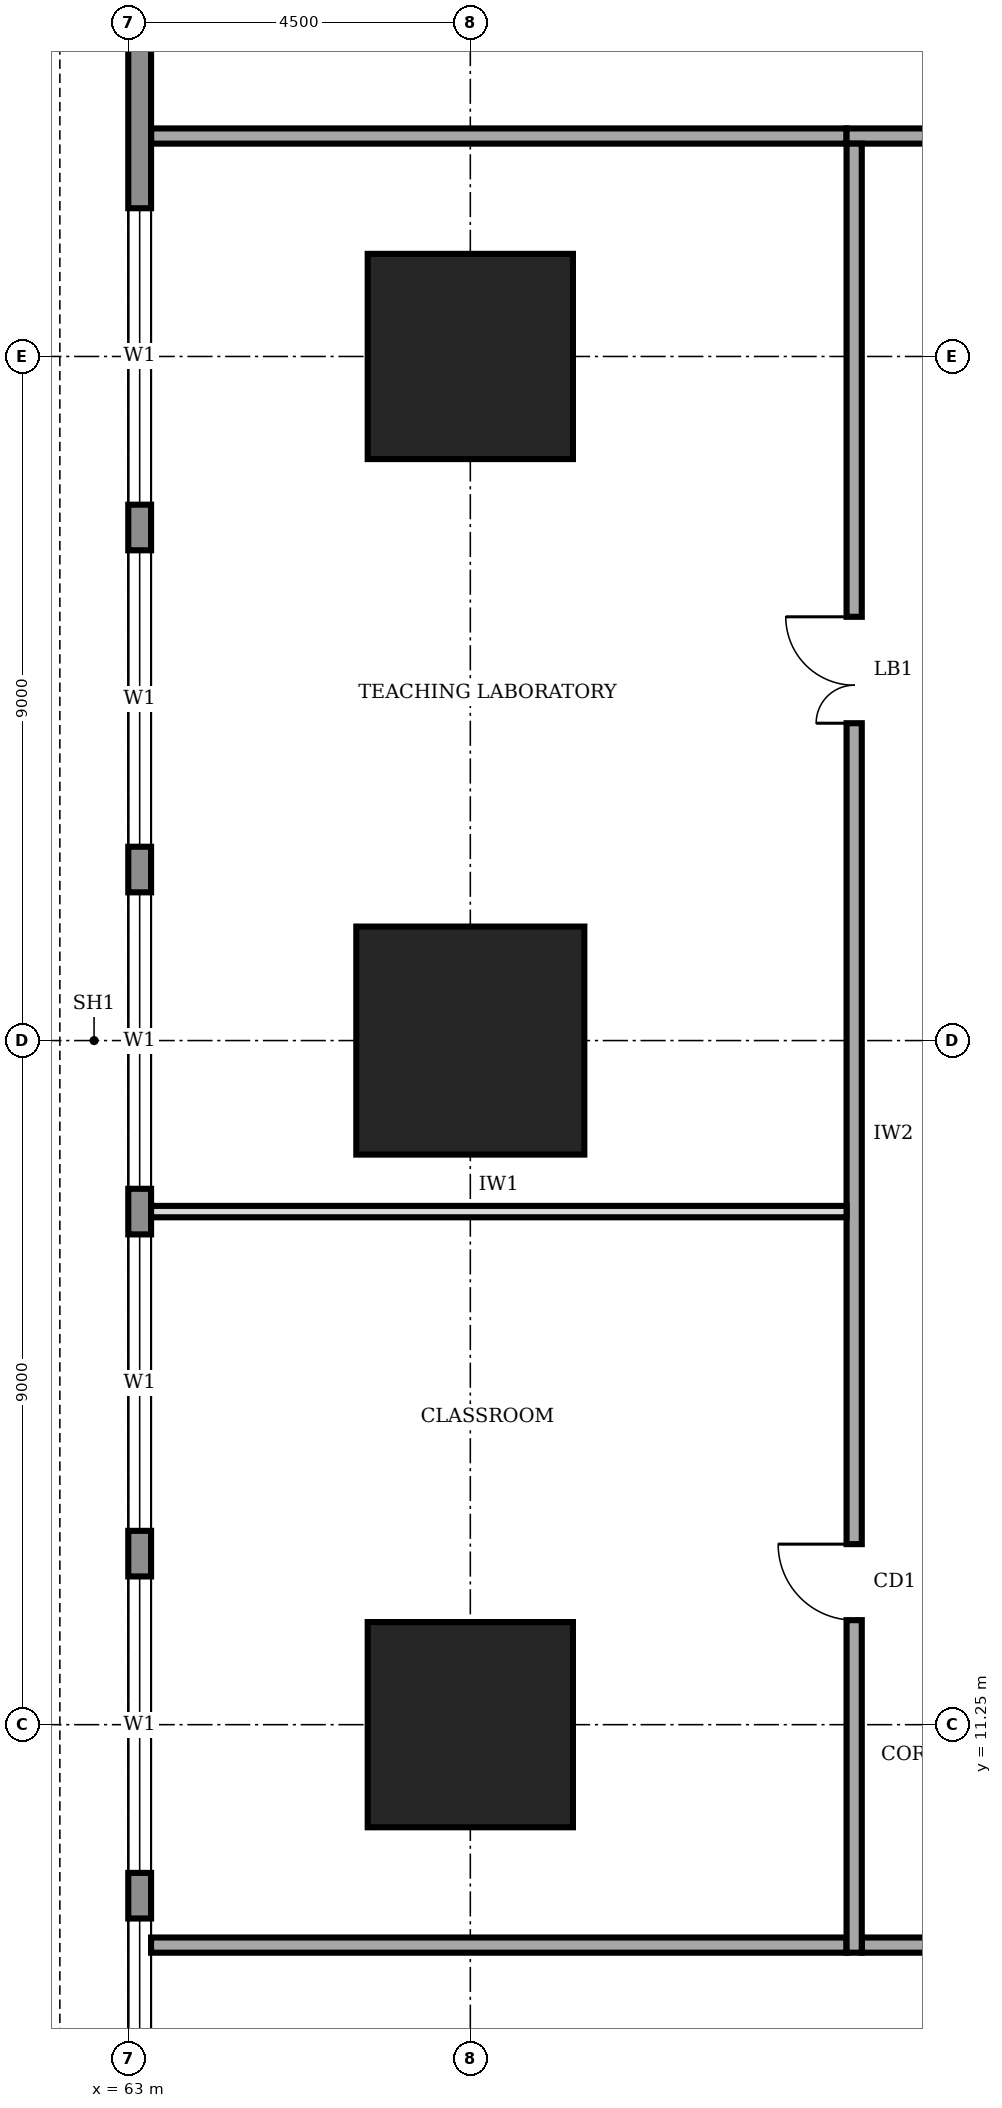
"""IFC4 building model, lengths in metres.
Left out: names, types, materials, properties, quantities, classifications, styles, units other than length and angle.
Written with IfcOpenShell. Run it as: python <this file> out.ifc"""

import sys

from ifc_helpers import new_model, si_unit, direction, frame, frame_2d, origin, origin_2d, place, context, subcontext, project, spatial, rectangle, extrude, element, fill, save


model = new_model("IFC4")
c1 = context("Model", 3, precision=1e-05, world=origin(), true_north=direction((0.0, 1.0)))
c2 = subcontext(c1, "Body", "Model", "MODEL_VIEW")
j1 = project(units=[si_unit("LENGTHUNIT", "METRE"), si_unit("PLANEANGLEUNIT", "RADIAN")], contexts=[c1])
p1 = place(None, origin())
s1 = spatial("IfcSite", under=j1, at=p1, CompositionType="ELEMENT")
p2 = place(p1, origin())
s2 = spatial("IfcBuilding", under=s1, at=p2, CompositionType="ELEMENT")
p3 = place(p2, frame((0.0, 0.0, 45.0)))
s3 = spatial("IfcBuildingStorey", under=s2, at=p3, CompositionType="ELEMENT", Elevation=45.0)
p4 = place(p3, frame((67.5, 11.25, 0.0), z_axis=(0.0, 0.0, 1.0), x_axis=(1.0, 0.0, 0.0)))
e1 = element("IfcColumn", 1, at=p4, inside=s3, PredefinedType="COLUMN", context=c2, shape_type="SweptSolid", body=[
    extrude(rectangle(XDim=2.7, YDim=2.7, at=origin_2d()), origin(), (0.0, 0.0, 1.0), 4.0),
])
p5 = place(p3, frame((67.5, 20.25, 0.0), z_axis=(0.0, 0.0, 1.0), x_axis=(1.0, 0.0, 0.0)))
e2 = element("IfcColumn", 2, at=p5, inside=s3, PredefinedType="COLUMN", context=c2, shape_type="SweptSolid", body=[
    extrude(rectangle(XDim=3.0, YDim=3.0, at=origin_2d()), origin(), (0.0, 0.0, 1.0), 4.0),
])
p6 = place(p3, frame((67.5, 29.25, 0.0), z_axis=(0.0, 0.0, 1.0), x_axis=(1.0, 0.0, 0.0)))
e3 = element("IfcColumn", 3, at=p6, inside=s3, PredefinedType="COLUMN", context=c2, shape_type="SweptSolid", body=[
    extrude(rectangle(XDim=2.7, YDim=2.7, at=origin_2d()), origin(), (0.0, 0.0, 1.0), 4.0),
])
p7 = place(p3, frame((63.15, 35.98, 0.0), z_axis=(0.0, 0.0, 1.0), x_axis=(0.0, -1.0, 0.0)))
e4 = element("IfcWall", 4, at=p7, inside=s3, PredefinedType="STANDARD", context=c2, shape_type="SweptSolid", body=[
    extrude(rectangle(XDim=31.46, YDim=0.3, at=frame_2d((15.73, 0.0))), origin(), (0.0, 0.0, 1.0), 3.75),
])
p8 = place(p7, frame((27.28, 0.0, 0.9)))
e5 = element("IfcOpeningElement", 5, at=p8, cuts=e4, PredefinedType="OPENING", context=c2, shape_type="SweptSolid", body=[
    extrude(rectangle(XDim=3.9, YDim=2.2, at=frame_2d((1.95, 1.1))), frame((0.0, 0.16, 0.0), z_axis=(0.0, -1.0, 0.0), x_axis=(1.0, 0.0, 0.0)), (0.0, 0.0, 1.0), 0.32),
])
p9 = place(p7, frame((22.78, 0.0, 0.9)))
e6 = element("IfcOpeningElement", 6, at=p9, cuts=e4, PredefinedType="OPENING", context=c2, shape_type="SweptSolid", body=[
    extrude(rectangle(XDim=3.9, YDim=2.2, at=frame_2d((1.95, 1.1))), frame((0.0, 0.16, 0.0), z_axis=(0.0, -1.0, 0.0), x_axis=(1.0, 0.0, 0.0)), (0.0, 0.0, 1.0), 0.32),
])
p10 = place(p7, frame((18.28, 0.0, 0.9)))
e7 = element("IfcOpeningElement", 7, at=p10, cuts=e4, PredefinedType="OPENING", context=c2, shape_type="SweptSolid", body=[
    extrude(rectangle(XDim=3.9, YDim=2.2, at=frame_2d((1.95, 1.1))), frame((0.0, 0.16, 0.0), z_axis=(0.0, -1.0, 0.0), x_axis=(1.0, 0.0, 0.0)), (0.0, 0.0, 1.0), 0.32),
])
p11 = place(p7, frame((13.78, 0.0, 0.9)))
e8 = element("IfcOpeningElement", 8, at=p11, cuts=e4, PredefinedType="OPENING", context=c2, shape_type="SweptSolid", body=[
    extrude(rectangle(XDim=3.9, YDim=2.2, at=frame_2d((1.95, 1.1))), frame((0.0, 0.16, 0.0), z_axis=(0.0, -1.0, 0.0), x_axis=(1.0, 0.0, 0.0)), (0.0, 0.0, 1.0), 0.32),
])
p12 = place(p7, frame((9.28, 0.0, 0.9)))
e9 = element("IfcOpeningElement", 9, at=p12, cuts=e4, PredefinedType="OPENING", context=c2, shape_type="SweptSolid", body=[
    extrude(rectangle(XDim=3.9, YDim=2.2, at=frame_2d((1.95, 1.1))), frame((0.0, 0.16, 0.0), z_axis=(0.0, -1.0, 0.0), x_axis=(1.0, 0.0, 0.0)), (0.0, 0.0, 1.0), 0.32),
])
p13 = place(p7, frame((4.78, 0.0, 0.9)))
e10 = element("IfcOpeningElement", 10, at=p13, cuts=e4, PredefinedType="OPENING", context=c2, shape_type="SweptSolid", body=[
    extrude(rectangle(XDim=3.9, YDim=2.2, at=frame_2d((1.95, 1.1))), frame((0.0, 0.16, 0.0), z_axis=(0.0, -1.0, 0.0), x_axis=(1.0, 0.0, 0.0)), (0.0, 0.0, 1.0), 0.32),
])
p14 = place(p3, frame((72.65, 8.35, 0.0), z_axis=(0.0, 0.0, 1.0), x_axis=(1.0, 0.0, 0.0)))
e11 = element("IfcWall", 11, at=p14, inside=s3, PredefinedType="SOLIDWALL", context=c2, shape_type="SweptSolid", body=[
    extrude(rectangle(XDim=16.9, YDim=0.2, at=frame_2d((8.45, 0.0))), origin(), (0.0, 0.0, 1.0), 3.75),
])
p15 = place(p14, frame((1.325, 0.0, 0.0)))
e12 = element("IfcOpeningElement", 12, at=p15, cuts=e11, PredefinedType="OPENING", context=c2, shape_type="SweptSolid", body=[
    extrude(rectangle(XDim=1.0, YDim=2.1, at=frame_2d((0.5, 1.05))), frame((0.0, 0.11, 0.0), z_axis=(0.0, -1.0, 0.0), x_axis=(1.0, 0.0, 0.0)), (0.0, 0.0, 1.0), 0.22),
])
p16 = place(p14, frame((5.6, 0.0, 0.0)))
e13 = element("IfcOpeningElement", 13, at=p16, cuts=e11, PredefinedType="OPENING", context=c2, shape_type="SweptSolid", body=[
    extrude(rectangle(XDim=1.0, YDim=2.1, at=frame_2d((0.5, 1.05))), frame((0.0, 0.11, 0.0), z_axis=(0.0, -1.0, 0.0), x_axis=(1.0, 0.0, 0.0)), (0.0, 0.0, 1.0), 0.22),
])
p17 = place(p14, frame((11.925, 0.0, 0.0)))
e14 = element("IfcOpeningElement", 14, at=p17, cuts=e11, PredefinedType="OPENING", context=c2, shape_type="SweptSolid", body=[
    extrude(rectangle(XDim=1.4, YDim=2.1, at=frame_2d((0.7, 1.05))), frame((0.0, 0.11, 0.0), z_axis=(0.0, -1.0, 0.0), x_axis=(1.0, 0.0, 0.0)), (0.0, 0.0, 1.0), 0.22),
])
p18 = place(p3, frame((89.35, 32.15, 0.0), z_axis=(0.0, 0.0, 1.0), x_axis=(-1.0, 0.0, 0.0)))
e15 = element("IfcWall", 15, at=p18, inside=s3, PredefinedType="SOLIDWALL", context=c2, shape_type="SweptSolid", body=[
    extrude(rectangle(XDim=16.9, YDim=0.2, at=frame_2d((8.45, 0.0))), origin(), (0.0, 0.0, 1.0), 3.75),
])
p19 = place(p18, frame((14.375, 0.0, 0.0)))
e16 = element("IfcOpeningElement", 16, at=p19, cuts=e15, PredefinedType="OPENING", context=c2, shape_type="SweptSolid", body=[
    extrude(rectangle(XDim=1.0, YDim=2.1, at=frame_2d((0.5, 1.05))), frame((0.0, 0.11, 0.0), z_axis=(0.0, -1.0, 0.0), x_axis=(1.0, 0.0, 0.0)), (0.0, 0.0, 1.0), 0.22),
])
p20 = place(p18, frame((7.85, 0.0, 0.0)))
e17 = element("IfcOpeningElement", 17, at=p20, cuts=e15, PredefinedType="OPENING", context=c2, shape_type="SweptSolid", body=[
    extrude(rectangle(XDim=1.0, YDim=2.1, at=frame_2d((0.5, 1.05))), frame((0.0, 0.11, 0.0), z_axis=(0.0, -1.0, 0.0), x_axis=(1.0, 0.0, 0.0)), (0.0, 0.0, 1.0), 0.22),
])
p21 = place(p18, frame((1.325, 0.0, 0.0)))
e18 = element("IfcOpeningElement", 18, at=p21, cuts=e15, PredefinedType="OPENING", context=c2, shape_type="SweptSolid", body=[
    extrude(rectangle(XDim=1.0, YDim=2.1, at=frame_2d((0.5, 1.05))), frame((0.0, 0.11, 0.0), z_axis=(0.0, -1.0, 0.0), x_axis=(1.0, 0.0, 0.0)), (0.0, 0.0, 1.0), 0.22),
])
p22 = place(p3, frame((72.55, 32.05, 0.0), z_axis=(0.0, 0.0, 1.0), x_axis=(0.0, -1.0, 0.0)))
e19 = element("IfcWall", 19, at=p22, inside=s3, PredefinedType="SOLIDWALL", context=c2, shape_type="SweptSolid", body=[
    extrude(rectangle(XDim=23.8, YDim=0.2, at=frame_2d((11.9, 0.0))), origin(), (0.0, 0.0, 1.0), 3.75),
])
p23 = place(p22, frame((18.425, 0.0, 0.0)))
e20 = element("IfcOpeningElement", 20, at=p23, cuts=e19, PredefinedType="OPENING", context=c2, shape_type="SweptSolid", body=[
    extrude(rectangle(XDim=1.0, YDim=2.1, at=frame_2d((0.5, 1.05))), frame((0.0, 0.11, 0.0), z_axis=(0.0, -1.0, 0.0), x_axis=(1.0, 0.0, 0.0)), (0.0, 0.0, 1.0), 0.22),
])
p24 = place(p22, frame((6.225, 0.0, 0.0)))
e21 = element("IfcOpeningElement", 21, at=p24, cuts=e19, PredefinedType="OPENING", context=c2, shape_type="SweptSolid", body=[
    extrude(rectangle(XDim=1.4, YDim=2.1, at=frame_2d((0.7, 1.05))), frame((0.0, 0.11, 0.0), z_axis=(0.0, -1.0, 0.0), x_axis=(1.0, 0.0, 0.0)), (0.0, 0.0, 1.0), 0.22),
])
for number, where, z_axis, x_axis in (
    (22, (63.3, 8.35, 0.0), (0.0, 0.0, 1.0), (1.0, 0.0, 0.0)),
    (23, (63.3, 32.15, 0.0), (0.0, 0.0, 1.0), (1.0, 0.0, 0.0)),
):
    element("IfcWall", number, at=place(p3, frame(where, z_axis=z_axis, x_axis=x_axis)), inside=s3, PredefinedType="SOLIDWALL", context=c2, shape_type="SweptSolid", body=[
        extrude(rectangle(XDim=9.15, YDim=0.2, at=frame_2d((4.575, 0.0))), origin(), (0.0, 0.0, 1.0), 3.75),
    ])
p25 = place(p3, frame((63.3, 18.0, 0.0), z_axis=(0.0, 0.0, 1.0), x_axis=(1.0, 0.0, 0.0)))
e24 = element("IfcWall", 24, at=p25, inside=s3, PredefinedType="PARTITIONING", context=c2, shape_type="SweptSolid", body=[
    extrude(rectangle(XDim=9.15, YDim=0.15, at=frame_2d((4.575, 0.0))), origin(), (0.0, 0.0, 1.0), 3.75),
])
p26 = place(p8, origin())
e25 = element("IfcWindow", 25, at=p26, inside=s3, PartitioningType="SINGLE_PANEL", PredefinedType="WINDOW", context=c2, shape_type="SweptSolid", body=[
    extrude(rectangle(XDim=3.9, YDim=2.2, at=frame_2d((1.95, 1.1))), frame((0.0, 0.03, 0.0), z_axis=(0.0, -1.0, 0.0), x_axis=(1.0, 0.0, 0.0)), (0.0, 0.0, 1.0), 0.06),
])
fill(e5, e25)
p27 = place(p9, origin())
e26 = element("IfcWindow", 26, at=p27, inside=s3, PartitioningType="SINGLE_PANEL", PredefinedType="WINDOW", context=c2, shape_type="SweptSolid", body=[
    extrude(rectangle(XDim=3.9, YDim=2.2, at=frame_2d((1.95, 1.1))), frame((0.0, 0.03, 0.0), z_axis=(0.0, -1.0, 0.0), x_axis=(1.0, 0.0, 0.0)), (0.0, 0.0, 1.0), 0.06),
])
fill(e6, e26)
p28 = place(p10, origin())
e27 = element("IfcWindow", 27, at=p28, inside=s3, PartitioningType="SINGLE_PANEL", PredefinedType="WINDOW", context=c2, shape_type="SweptSolid", body=[
    extrude(rectangle(XDim=3.9, YDim=2.2, at=frame_2d((1.95, 1.1))), frame((0.0, 0.03, 0.0), z_axis=(0.0, -1.0, 0.0), x_axis=(1.0, 0.0, 0.0)), (0.0, 0.0, 1.0), 0.06),
])
fill(e7, e27)
p29 = place(p11, origin())
e28 = element("IfcWindow", 28, at=p29, inside=s3, PartitioningType="SINGLE_PANEL", PredefinedType="WINDOW", context=c2, shape_type="SweptSolid", body=[
    extrude(rectangle(XDim=3.9, YDim=2.2, at=frame_2d((1.95, 1.1))), frame((0.0, 0.03, 0.0), z_axis=(0.0, -1.0, 0.0), x_axis=(1.0, 0.0, 0.0)), (0.0, 0.0, 1.0), 0.06),
])
fill(e8, e28)
p30 = place(p12, origin())
e29 = element("IfcWindow", 29, at=p30, inside=s3, PartitioningType="SINGLE_PANEL", PredefinedType="WINDOW", context=c2, shape_type="SweptSolid", body=[
    extrude(rectangle(XDim=3.9, YDim=2.2, at=frame_2d((1.95, 1.1))), frame((0.0, 0.03, 0.0), z_axis=(0.0, -1.0, 0.0), x_axis=(1.0, 0.0, 0.0)), (0.0, 0.0, 1.0), 0.06),
])
fill(e9, e29)
p31 = place(p13, origin())
e30 = element("IfcWindow", 30, at=p31, inside=s3, PartitioningType="SINGLE_PANEL", PredefinedType="WINDOW", context=c2, shape_type="SweptSolid", body=[
    extrude(rectangle(XDim=3.9, YDim=2.2, at=frame_2d((1.95, 1.1))), frame((0.0, 0.03, 0.0), z_axis=(0.0, -1.0, 0.0), x_axis=(1.0, 0.0, 0.0)), (0.0, 0.0, 1.0), 0.06),
])
fill(e10, e30)
p32 = place(p23, frame((1.0, 0.0, 0.0), z_axis=(0.0, 0.0, 1.0), x_axis=(-1.0, 0.0, 0.0)))
e31 = element("IfcDoor", 31, at=p32, inside=s3, OperationType="SINGLE_SWING_RIGHT", PredefinedType="DOOR", context=c2, shape_type="SweptSolid", body=[
    extrude(rectangle(XDim=1.0, YDim=2.1, at=frame_2d((0.5, 1.05))), frame((0.0, 0.025, 0.0), z_axis=(0.0, -1.0, 0.0), x_axis=(1.0, 0.0, 0.0)), (0.0, 0.0, 1.0), 0.05),
])
fill(e20, e31)
p33 = place(p24, frame((1.4, 0.0, 0.0), z_axis=(0.0, 0.0, 1.0), x_axis=(-1.0, 0.0, 0.0)))
e32 = element("IfcDoor", 32, at=p33, inside=s3, OperationType="DOUBLE_DOOR_SINGLE_SWING", PredefinedType="DOOR", context=c2, shape_type="SweptSolid", body=[
    extrude(rectangle(XDim=1.4, YDim=2.1, at=frame_2d((0.7, 1.05))), frame((0.0, 0.025, 0.0), z_axis=(0.0, -1.0, 0.0), x_axis=(1.0, 0.0, 0.0)), (0.0, 0.0, 1.0), 0.05),
])
fill(e21, e32)
save(model, sys.argv[1])
